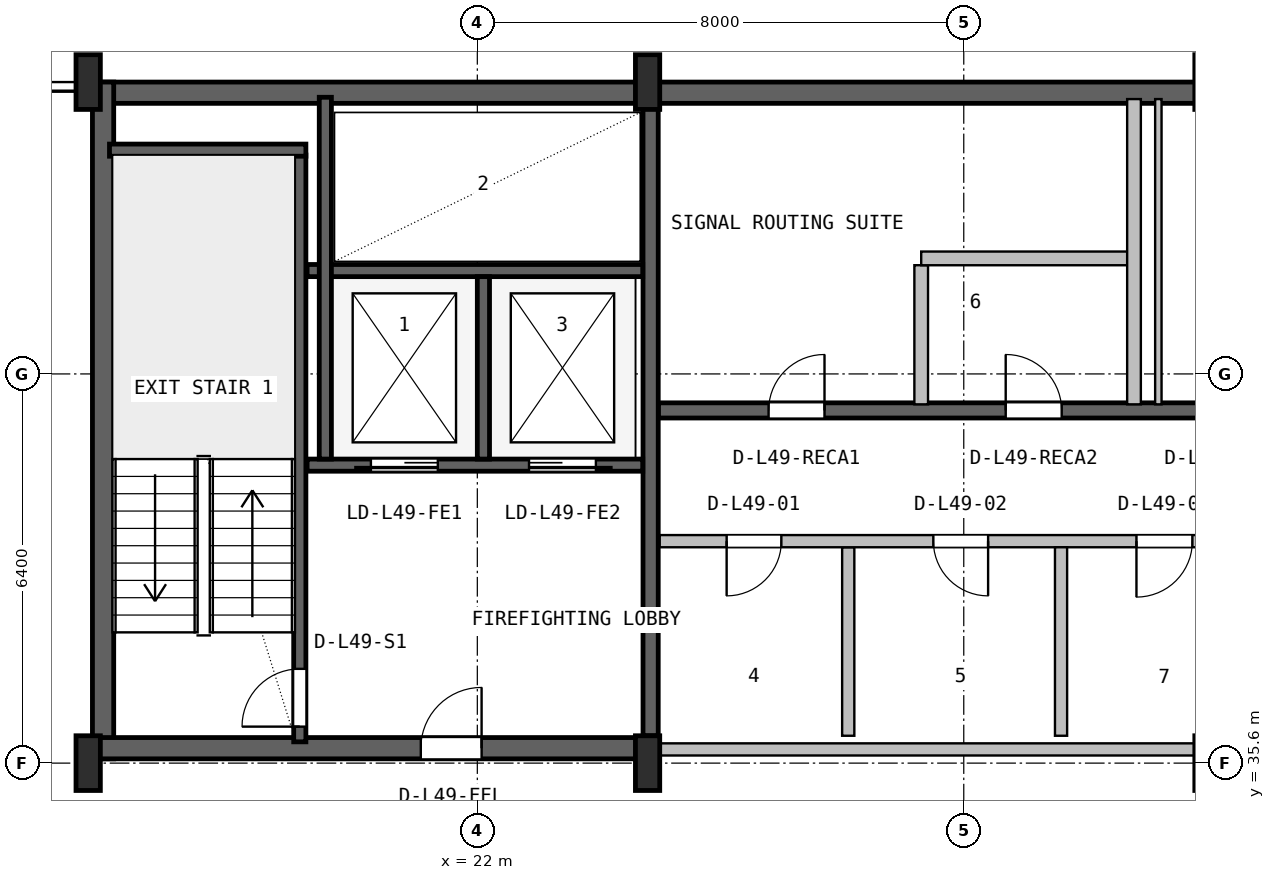
"""IFC4 building model, lengths in metres.
Left out: names, types, materials, properties, quantities, classifications, styles, units other than length and angle.
Written with IfcOpenShell. Run it as: python <this file> out.ifc"""

import sys

from ifc_helpers import new_model, si_unit, direction, frame, frame_2d, origin, origin_2d, place, context, subcontext, project, spatial, rectangle, i_section, extrude, source, transform, mapped, element, fill, save


model = new_model("IFC4")
c1 = context("Model", 3, precision=1e-05, world=origin(), true_north=direction((0.0, 1.0)))
c2 = subcontext(c1, "Body", "Model", "MODEL_VIEW")
j1 = project(units=[si_unit("LENGTHUNIT", "METRE"), si_unit("PLANEANGLEUNIT", "RADIAN")], contexts=[c1])
p1 = place(None, origin())
s1 = spatial("IfcSite", under=j1, at=p1, CompositionType="ELEMENT")
p2 = place(p1, origin())
s2 = spatial("IfcBuilding", under=s1, at=p2, CompositionType="ELEMENT")
p3 = place(p2, frame((0.0, 0.0, 199.8)))
s3 = spatial("IfcBuildingStorey", under=s2, at=p3, CompositionType="ELEMENT", Elevation=199.8)
p4 = place(p3, frame((15.6, 46.625, 0.0), z_axis=(0.0, 0.0, 1.0), x_axis=(1.0, 0.0, 0.0)))
e1 = element("IfcWall", 1, at=p4, inside=s3, PredefinedType="SHEAR", context=c2, shape_type="SweptSolid", body=[
    extrude(rectangle(XDim=36.8, YDim=0.35, at=frame_2d((18.4, 0.0))), origin(), (0.0, 0.0, 1.0), 3.55),
])
p5 = place(p3, frame((15.845, 35.67, 0.0), z_axis=(0.0, 0.0, 1.0), x_axis=(0.0, 1.0, 0.0)))
e2 = element("IfcWall", 2, at=p5, inside=s3, PredefinedType="SHEAR", context=c2, shape_type="SweptSolid", body=[
    extrude(rectangle(XDim=11.13, YDim=0.35, at=frame_2d((5.565, 0.0))), origin(), (0.0, 0.0, 1.0), 3.55),
])
p6 = place(p3, frame((15.67, 35.845, 0.0), z_axis=(0.0, 0.0, 1.0), x_axis=(1.0, 0.0, 0.0)))
e3 = element("IfcWall", 3, at=p6, inside=s3, PredefinedType="SHEAR", context=c2, shape_type="SweptSolid", body=[
    extrude(rectangle(XDim=9.13, YDim=0.35, at=frame_2d((4.565, 0.0))), origin(), (0.0, 0.0, 1.0), 3.55),
])
p7 = place(p6, frame((5.4, 0.0, 0.0)))
e4 = element("IfcOpeningElement", 4, at=p7, cuts=e3, PredefinedType="OPENING", context=c2, shape_type="SweptSolid", body=[
    extrude(rectangle(XDim=1.0, YDim=2.1, at=frame_2d((0.5, 1.05))), frame((0.0, 0.185, 0.0), z_axis=(0.0, -1.0, 0.0), x_axis=(1.0, 0.0, 0.0)), (0.0, 0.0, 1.0), 0.37),
])
m1 = source(origin(), c2, "Body", "SweptSolid", [
    extrude(i_section(OverallWidth=0.4, OverallDepth=0.9, WebThickness=0.016, FlangeThickness=0.028, FilletRadius=0.016, at=origin_2d()), origin(), (0.0, 0.0, 1.0), 3.8),
])
for number, where, z_axis, x_axis in (
    (5, (15.6, 35.6, 0.0), (0.0, 0.0, 1.0), (1.0, 0.0, 0.0)),
    (6, (15.6, 46.8, 0.0), (0.0, 0.0, 1.0), (1.0, 0.0, 0.0)),
    (7, (24.8, 35.6, 0.0), (0.0, 0.0, 1.0), (1.0, 0.0, 0.0)),
    (8, (24.8, 46.8, 0.0), (0.0, 0.0, 1.0), (1.0, 0.0, 0.0)),
):
    element("IfcColumn", number, at=place(p3, frame(where, z_axis=z_axis, x_axis=x_axis)), inside=s3, PredefinedType="COLUMN", context=c2, shape_type="MappedRepresentation", body=[
        mapped(m1, transform((0.0, 0.0, 0.0), x_axis=(1.0, 0.0, 0.0), y_axis=(0.0, 1.0, 0.0), z_axis=(0.0, 0.0, 1.0), scale=1.0)),
    ])
p8 = place(p3, frame((19.08, 35.95, 0.0), z_axis=(0.0, 0.0, 1.0), x_axis=(0.0, 1.0, 0.0)))
e9 = element("IfcWall", 9, at=p8, inside=s3, PredefinedType="SHEAR", context=c2, shape_type="SweptSolid", body=[
    extrude(rectangle(XDim=9.65, YDim=0.2, at=frame_2d((4.825, 0.0))), origin(), (0.0, 0.0, 1.0), 3.55),
])
p9 = place(p8, frame((0.25, 0.0, 0.0)))
e10 = element("IfcOpeningElement", 10, at=p9, cuts=e9, PredefinedType="OPENING", context=c2, shape_type="SweptSolid", body=[
    extrude(rectangle(XDim=0.95, YDim=2.1, at=frame_2d((0.475, 1.05))), frame((0.0, 0.11, 0.0), z_axis=(0.0, -1.0, 0.0), x_axis=(1.0, 0.0, 0.0)), (0.0, 0.0, 1.0), 0.22),
])
p10 = place(p3, frame((15.95, 45.68, 0.0), z_axis=(0.0, 0.0, 1.0), x_axis=(1.0, 0.0, 0.0)))
e11 = element("IfcWall", 11, at=p10, inside=s3, PredefinedType="SHEAR", context=c2, shape_type="SweptSolid", body=[
    extrude(rectangle(XDim=3.23, YDim=0.2, at=frame_2d((1.615, 0.0))), origin(), (0.0, 0.0, 1.0), 3.55),
])
p11 = place(p3, frame((24.85, 36.05, 0.0), z_axis=(0.0, 0.0, 1.0), x_axis=(0.0, 1.0, 0.0)))
e12 = element("IfcWall", 12, at=p11, inside=s3, PredefinedType="SHEAR", context=c2, shape_type="SweptSolid", body=[
    extrude(rectangle(XDim=10.45, YDim=0.25, at=frame_2d((5.225, 0.0))), origin(), (0.0, 0.0, 1.0), 3.55),
])
p12 = place(p3, frame((19.2, 40.5, 0.0), z_axis=(0.0, 0.0, 1.0), x_axis=(1.0, 0.0, 0.0)))
e13 = element("IfcWall", 13, at=p12, inside=s3, PredefinedType="SHEAR", context=c2, shape_type="SweptSolid", body=[
    extrude(rectangle(XDim=5.52, YDim=0.2, at=frame_2d((2.76, 0.0))), origin(), (0.0, 0.0, 1.0), 3.55),
])
p13 = place(p12, frame((1.05, 0.0, 0.0)))
e14 = element("IfcOpeningElement", 14, at=p13, cuts=e13, PredefinedType="OPENING", context=c2, shape_type="SweptSolid", body=[
    extrude(rectangle(XDim=1.1, YDim=2.18, at=frame_2d((0.55, 1.09))), frame((0.0, 0.11, 0.0), z_axis=(0.0, -1.0, 0.0), x_axis=(1.0, 0.0, 0.0)), (0.0, 0.0, 1.0), 0.22),
])
p14 = place(p12, frame((3.65, 0.0, 0.0)))
e15 = element("IfcOpeningElement", 15, at=p14, cuts=e13, PredefinedType="OPENING", context=c2, shape_type="SweptSolid", body=[
    extrude(rectangle(XDim=1.1, YDim=2.18, at=frame_2d((0.55, 1.09))), frame((0.0, 0.11, 0.0), z_axis=(0.0, -1.0, 0.0), x_axis=(1.0, 0.0, 0.0)), (0.0, 0.0, 1.0), 0.22),
])
p15 = place(p3, frame((19.2, 43.7, 0.0), z_axis=(0.0, 0.0, 1.0), x_axis=(1.0, 0.0, 0.0)))
e16 = element("IfcWall", 16, at=p15, inside=s3, PredefinedType="SHEAR", context=c2, shape_type="SweptSolid", body=[
    extrude(rectangle(XDim=5.52, YDim=0.2, at=frame_2d((2.76, 0.0))), origin(), (0.0, 0.0, 1.0), 3.55),
])
p16 = place(p3, frame((22.1, 40.6, 0.0), z_axis=(0.0, 0.0, 1.0), x_axis=(0.0, 1.0, 0.0)))
e17 = element("IfcWall", 17, at=p16, inside=s3, PredefinedType="SHEAR", context=c2, shape_type="SweptSolid", body=[
    extrude(rectangle(XDim=3.0, YDim=0.2, at=frame_2d((1.5, 0.0))), origin(), (0.0, 0.0, 1.0), 3.55),
])
p17 = place(p3, frame((19.5, 40.6, 0.0), z_axis=(0.0, 0.0, 1.0), x_axis=(0.0, 1.0, 0.0)))
e18 = element("IfcWall", 18, at=p17, inside=s3, PredefinedType="SHEAR", context=c2, shape_type="SweptSolid", body=[
    extrude(rectangle(XDim=5.95, YDim=0.2, at=frame_2d((2.975, 0.0))), origin(), (0.0, 0.0, 1.0), 3.55),
])
p18 = place(p3, frame((24.98, 41.4, 0.0), z_axis=(0.0, 0.0, 1.0), x_axis=(1.0, 0.0, 0.0)))
e19 = element("IfcWall", 19, at=p18, inside=s3, PredefinedType="SHEAR", context=c2, shape_type="SweptSolid", body=[
    extrude(rectangle(XDim=23.82, YDim=0.25, at=frame_2d((11.91, 0.0))), origin(), (0.0, 0.0, 1.0), 3.55),
])
p19 = place(p18, frame((16.87, 0.0, 0.0)))
e20 = element("IfcOpeningElement", 20, at=p19, cuts=e19, PredefinedType="OPENING", context=c2, shape_type="SweptSolid", body=[
    extrude(rectangle(XDim=1.1, YDim=2.18, at=frame_2d((0.55, 1.09))), frame((0.0, 0.135, 0.0), z_axis=(0.0, -1.0, 0.0), x_axis=(1.0, 0.0, 0.0)), (0.0, 0.0, 1.0), 0.27),
])
p20 = place(p18, frame((19.47, 0.0, 0.0)))
e21 = element("IfcOpeningElement", 21, at=p20, cuts=e19, PredefinedType="OPENING", context=c2, shape_type="SweptSolid", body=[
    extrude(rectangle(XDim=1.1, YDim=2.18, at=frame_2d((0.55, 1.09))), frame((0.0, 0.135, 0.0), z_axis=(0.0, -1.0, 0.0), x_axis=(1.0, 0.0, 0.0)), (0.0, 0.0, 1.0), 0.27),
])
p21 = place(p18, frame((22.07, 0.0, 0.0)))
e22 = element("IfcOpeningElement", 22, at=p21, cuts=e19, PredefinedType="OPENING", context=c2, shape_type="SweptSolid", body=[
    extrude(rectangle(XDim=1.1, YDim=2.18, at=frame_2d((0.55, 1.09))), frame((0.0, 0.135, 0.0), z_axis=(0.0, -1.0, 0.0), x_axis=(1.0, 0.0, 0.0)), (0.0, 0.0, 1.0), 0.27),
])
p22 = place(p18, frame((1.81, 0.0, 0.0)))
e23 = element("IfcOpeningElement", 23, at=p22, cuts=e19, PredefinedType="OPENING", context=c2, shape_type="SweptSolid", body=[
    extrude(rectangle(XDim=0.92, YDim=2.08, at=frame_2d((0.46, 1.04))), frame((0.0, 0.135, 0.0), z_axis=(0.0, -1.0, 0.0), x_axis=(1.0, 0.0, 0.0)), (0.0, 0.0, 1.0), 0.27),
])
p23 = place(p18, frame((5.71, 0.0, 0.0)))
e24 = element("IfcOpeningElement", 24, at=p23, cuts=e19, PredefinedType="OPENING", context=c2, shape_type="SweptSolid", body=[
    extrude(rectangle(XDim=0.92, YDim=2.08, at=frame_2d((0.46, 1.04))), frame((0.0, 0.135, 0.0), z_axis=(0.0, -1.0, 0.0), x_axis=(1.0, 0.0, 0.0)), (0.0, 0.0, 1.0), 0.27),
])
p24 = place(p18, frame((9.21, 0.0, 0.0)))
e25 = element("IfcOpeningElement", 25, at=p24, cuts=e19, PredefinedType="OPENING", context=c2, shape_type="SweptSolid", body=[
    extrude(rectangle(XDim=0.92, YDim=2.08, at=frame_2d((0.46, 1.04))), frame((0.0, 0.135, 0.0), z_axis=(0.0, -1.0, 0.0), x_axis=(1.0, 0.0, 0.0)), (0.0, 0.0, 1.0), 0.27),
])
p25 = place(p18, frame((11.96, 0.0, 0.0)))
e26 = element("IfcOpeningElement", 26, at=p25, cuts=e19, PredefinedType="OPENING", context=c2, shape_type="SweptSolid", body=[
    extrude(rectangle(XDim=0.92, YDim=2.08, at=frame_2d((0.46, 1.04))), frame((0.0, 0.135, 0.0), z_axis=(0.0, -1.0, 0.0), x_axis=(1.0, 0.0, 0.0)), (0.0, 0.0, 1.0), 0.27),
])
p26 = place(p18, frame((14.31, 0.0, 0.0)))
e27 = element("IfcOpeningElement", 27, at=p26, cuts=e19, PredefinedType="OPENING", context=c2, shape_type="SweptSolid", body=[
    extrude(rectangle(XDim=0.92, YDim=2.08, at=frame_2d((0.46, 1.04))), frame((0.0, 0.135, 0.0), z_axis=(0.0, -1.0, 0.0), x_axis=(1.0, 0.0, 0.0)), (0.0, 0.0, 1.0), 0.27),
])
p27 = place(p3, frame((25.0, 35.825, 0.0), z_axis=(0.0, 0.0, 1.0), x_axis=(1.0, 0.0, 0.0)))
e28 = element("IfcWall", 28, at=p27, inside=s3, PredefinedType="SOLIDWALL", context=c2, shape_type="SweptSolid", body=[
    extrude(rectangle(XDim=12.95, YDim=0.2, at=frame_2d((6.475, 0.0))), origin(), (0.0, 0.0, 1.0), 2.575),
])
p28 = place(p3, frame((28.1, 36.05, 0.0), z_axis=(0.0, 0.0, 1.0), x_axis=(0.0, 1.0, 0.0)))
e29 = element("IfcWall", 29, at=p28, inside=s3, PredefinedType="PLUMBINGWALL", context=c2, shape_type="SweptSolid", body=[
    extrude(rectangle(XDim=3.1, YDim=0.2, at=frame_2d((1.55, 0.0))), origin(), (0.0, 0.0, 1.0), 3.53),
])
p29 = place(p3, frame((25.0, 39.25, 0.0), z_axis=(0.0, 0.0, 1.0), x_axis=(1.0, 0.0, 0.0)))
e30 = element("IfcWall", 30, at=p29, inside=s3, PredefinedType="SOLIDWALL", context=c2, shape_type="SweptSolid", body=[
    extrude(rectangle(XDim=12.95, YDim=0.2, at=frame_2d((6.475, 0.0))), origin(), (0.0, 0.0, 1.0), 3.53),
])
p30 = place(p29, frame((1.1, 0.0, 0.0)))
e31 = element("IfcOpeningElement", 31, at=p30, cuts=e30, PredefinedType="OPENING", context=c2, shape_type="SweptSolid", body=[
    extrude(rectangle(XDim=0.9, YDim=2.06, at=frame_2d((0.45, 1.03))), frame((0.0, 0.11, 0.0), z_axis=(0.0, -1.0, 0.0), x_axis=(1.0, 0.0, 0.0)), (0.0, 0.0, 1.0), 0.22),
])
p31 = place(p29, frame((4.5, 0.0, 0.0)))
e32 = element("IfcOpeningElement", 32, at=p31, cuts=e30, PredefinedType="OPENING", context=c2, shape_type="SweptSolid", body=[
    extrude(rectangle(XDim=0.9, YDim=2.06, at=frame_2d((0.45, 1.03))), frame((0.0, 0.11, 0.0), z_axis=(0.0, -1.0, 0.0), x_axis=(1.0, 0.0, 0.0)), (0.0, 0.0, 1.0), 0.22),
])
p32 = place(p29, frame((7.84, 0.0, 0.0)))
e33 = element("IfcOpeningElement", 33, at=p32, cuts=e30, PredefinedType="OPENING", context=c2, shape_type="SweptSolid", body=[
    extrude(rectangle(XDim=0.92, YDim=2.08, at=frame_2d((0.46, 1.04))), frame((0.0, 0.11, 0.0), z_axis=(0.0, -1.0, 0.0), x_axis=(1.0, 0.0, 0.0)), (0.0, 0.0, 1.0), 0.22),
])
p33 = place(p29, frame((10.875, 0.0, 0.0)))
e34 = element("IfcOpeningElement", 34, at=p33, cuts=e30, PredefinedType="OPENING", context=c2, shape_type="SweptSolid", body=[
    extrude(rectangle(XDim=1.2, YDim=2.1, at=frame_2d((0.6, 1.05))), frame((0.0, 0.11, 0.0), z_axis=(0.0, -1.0, 0.0), x_axis=(1.0, 0.0, 0.0)), (0.0, 0.0, 1.0), 0.22),
])
p34 = place(p3, frame((31.6, 36.05, 0.0), z_axis=(0.0, 0.0, 1.0), x_axis=(0.0, 1.0, 0.0)))
e35 = element("IfcWall", 35, at=p34, inside=s3, PredefinedType="PLUMBINGWALL", context=c2, shape_type="SweptSolid", body=[
    extrude(rectangle(XDim=3.1, YDim=0.2, at=frame_2d((1.55, 0.0))), origin(), (0.0, 0.0, 1.0), 3.53),
])
p35 = place(p3, frame((29.3, 41.5, 0.0), z_axis=(0.0, 0.0, 1.0), x_axis=(0.0, 1.0, 0.0)))
e36 = element("IfcWall", 36, at=p35, inside=s3, PredefinedType="PARTITIONING", context=c2, shape_type="SweptSolid", body=[
    extrude(rectangle(XDim=2.288, YDim=0.225, at=frame_2d((1.144, 0.0))), origin(), (0.0, 0.0, 1.0), 3.53),
])
p36 = place(p3, frame((29.3, 43.9, 0.0), z_axis=(0.0, 0.0, 1.0), x_axis=(1.0, 0.0, 0.0)))
e37 = element("IfcWall", 37, at=p36, inside=s3, PredefinedType="PARTITIONING", context=c2, shape_type="SweptSolid", body=[
    extrude(rectangle(XDim=3.5, YDim=0.225, at=frame_2d((1.75, 0.0))), origin(), (0.0, 0.0, 1.0), 3.53),
])
p37 = place(p3, frame((32.8, 41.5, 0.0), z_axis=(0.0, 0.0, 1.0), x_axis=(0.0, 1.0, 0.0)))
e38 = element("IfcWall", 38, at=p37, inside=s3, PredefinedType="PARTITIONING", context=c2, shape_type="SweptSolid", body=[
    extrude(rectangle(XDim=5.02, YDim=0.225, at=frame_2d((2.51, 0.0))), origin(), (0.0, 0.0, 1.0), 3.53),
])
p38 = place(p3, frame((33.2, 41.5, 0.0), z_axis=(0.0, 0.0, 1.0), x_axis=(0.0, 1.0, 0.0)))
e39 = element("IfcWall", 39, at=p38, inside=s3, PredefinedType="PARTITIONING", context=c2, shape_type="SweptSolid", body=[
    extrude(rectangle(XDim=5.02, YDim=0.105, at=frame_2d((2.51, 0.0))), origin(), (0.0, 0.0, 1.0), 3.53),
])
m2 = source(origin(), c2, "Body", "SweptSolid", [
    extrude(rectangle(XDim=0.95, YDim=2.1, at=frame_2d((0.475, 1.05))), frame((0.0, 0.025, 0.0), z_axis=(0.0, -1.0, 0.0), x_axis=(1.0, 0.0, 0.0)), (0.0, 0.0, 1.0), 0.05),
])
p39 = place(p9, origin())
e40 = element("IfcDoor", 40, at=p39, inside=s3, OperationType="SINGLE_SWING_LEFT", PredefinedType="DOOR", context=c2, shape_type="MappedRepresentation", body=[
    mapped(m2, transform((0.0, 0.0, 0.0), x_axis=(1.0, 0.0, 0.0), y_axis=(0.0, 1.0, 0.0), z_axis=(0.0, 0.0, 1.0), scale=1.0)),
])
fill(e10, e40)
m3 = source(origin(), c2, "Body", "SweptSolid", [
    extrude(rectangle(XDim=1.0, YDim=2.1, at=frame_2d((0.5, 1.05))), frame((0.0, 0.025, 0.0), z_axis=(0.0, -1.0, 0.0), x_axis=(1.0, 0.0, 0.0)), (0.0, 0.0, 1.0), 0.05),
])
p40 = place(p7, origin())
e41 = element("IfcDoor", 41, at=p40, inside=s3, OperationType="SINGLE_SWING_RIGHT", PredefinedType="DOOR", context=c2, shape_type="MappedRepresentation", body=[
    mapped(m3, transform((0.0, 0.0, 0.0), x_axis=(1.0, 0.0, 0.0), y_axis=(0.0, 1.0, 0.0), z_axis=(0.0, 0.0, 1.0), scale=1.0)),
])
fill(e4, e41)
m4 = source(origin(), c2, "Body", "SweptSolid", [
    extrude(rectangle(XDim=1.1, YDim=2.18, at=frame_2d((0.55, 1.09))), frame((0.0, 0.025, 0.0), z_axis=(0.0, -1.0, 0.0), x_axis=(1.0, 0.0, 0.0)), (0.0, 0.0, 1.0), 0.05),
])
p41 = place(p13, frame((1.1, 0.0, 0.0), z_axis=(0.0, 0.0, 1.0), x_axis=(-1.0, 0.0, 0.0)))
e42 = element("IfcDoor", 42, at=p41, inside=s3, OperationType="SLIDING_TO_LEFT", PredefinedType="DOOR", context=c2, shape_type="MappedRepresentation", body=[
    mapped(m4, transform((0.0, 0.0, 0.0), x_axis=(1.0, 0.0, 0.0), y_axis=(0.0, 1.0, 0.0), z_axis=(0.0, 0.0, 1.0), scale=1.0)),
])
fill(e14, e42)
p42 = place(p14, frame((1.1, 0.0, 0.0), z_axis=(0.0, 0.0, 1.0), x_axis=(-1.0, 0.0, 0.0)))
e43 = element("IfcDoor", 43, at=p42, inside=s3, OperationType="SLIDING_TO_RIGHT", PredefinedType="DOOR", context=c2, shape_type="MappedRepresentation", body=[
    mapped(m4, transform((0.0, 0.0, 0.0), x_axis=(1.0, 0.0, 0.0), y_axis=(0.0, 1.0, 0.0), z_axis=(0.0, 0.0, 1.0), scale=1.0)),
])
fill(e15, e43)
m5 = source(origin(), c2, "Body", "SweptSolid", [
    extrude(rectangle(XDim=0.92, YDim=2.08, at=frame_2d((0.46, 1.04))), frame((0.0, 0.025, 0.0), z_axis=(0.0, -1.0, 0.0), x_axis=(1.0, 0.0, 0.0)), (0.0, 0.0, 1.0), 0.05),
])
p43 = place(p22, origin())
e44 = element("IfcDoor", 44, at=p43, inside=s3, OperationType="SINGLE_SWING_RIGHT", PredefinedType="DOOR", context=c2, shape_type="MappedRepresentation", body=[
    mapped(m5, transform((0.0, 0.0, 0.0), x_axis=(1.0, 0.0, 0.0), y_axis=(0.0, 1.0, 0.0), z_axis=(0.0, 0.0, 1.0), scale=1.0)),
])
fill(e23, e44)
p44 = place(p23, origin())
e45 = element("IfcDoor", 45, at=p44, inside=s3, OperationType="SINGLE_SWING_LEFT", PredefinedType="DOOR", context=c2, shape_type="MappedRepresentation", body=[
    mapped(m5, transform((0.0, 0.0, 0.0), x_axis=(1.0, 0.0, 0.0), y_axis=(0.0, 1.0, 0.0), z_axis=(0.0, 0.0, 1.0), scale=1.0)),
])
fill(e24, e45)
m6 = source(origin(), c2, "Body", "SweptSolid", [
    extrude(rectangle(XDim=0.9, YDim=2.06, at=frame_2d((0.45, 1.03))), frame((0.0, 0.025, 0.0), z_axis=(0.0, -1.0, 0.0), x_axis=(1.0, 0.0, 0.0)), (0.0, 0.0, 1.0), 0.05),
])
p45 = place(p30, frame((0.9, 0.0, 0.0), z_axis=(0.0, 0.0, 1.0), x_axis=(-1.0, 0.0, 0.0)))
e46 = element("IfcDoor", 46, at=p45, inside=s3, OperationType="SINGLE_SWING_LEFT", PredefinedType="DOOR", context=c2, shape_type="MappedRepresentation", body=[
    mapped(m6, transform((0.0, 0.0, 0.0), x_axis=(1.0, 0.0, 0.0), y_axis=(0.0, 1.0, 0.0), z_axis=(0.0, 0.0, 1.0), scale=1.0)),
])
fill(e31, e46)
p46 = place(p31, frame((0.9, 0.0, 0.0), z_axis=(0.0, 0.0, 1.0), x_axis=(-1.0, 0.0, 0.0)))
e47 = element("IfcDoor", 47, at=p46, inside=s3, OperationType="SINGLE_SWING_RIGHT", PredefinedType="DOOR", context=c2, shape_type="MappedRepresentation", body=[
    mapped(m6, transform((0.0, 0.0, 0.0), x_axis=(1.0, 0.0, 0.0), y_axis=(0.0, 1.0, 0.0), z_axis=(0.0, 0.0, 1.0), scale=1.0)),
])
fill(e32, e47)
p47 = place(p32, frame((0.92, 0.0, 0.0), z_axis=(0.0, 0.0, 1.0), x_axis=(-1.0, 0.0, 0.0)))
e48 = element("IfcDoor", 48, at=p47, inside=s3, OperationType="SINGLE_SWING_LEFT", PredefinedType="DOOR", context=c2, shape_type="MappedRepresentation", body=[
    mapped(m5, transform((0.0, 0.0, 0.0), x_axis=(1.0, 0.0, 0.0), y_axis=(0.0, 1.0, 0.0), z_axis=(0.0, 0.0, 1.0), scale=1.0)),
])
fill(e33, e48)
save(model, sys.argv[1])
